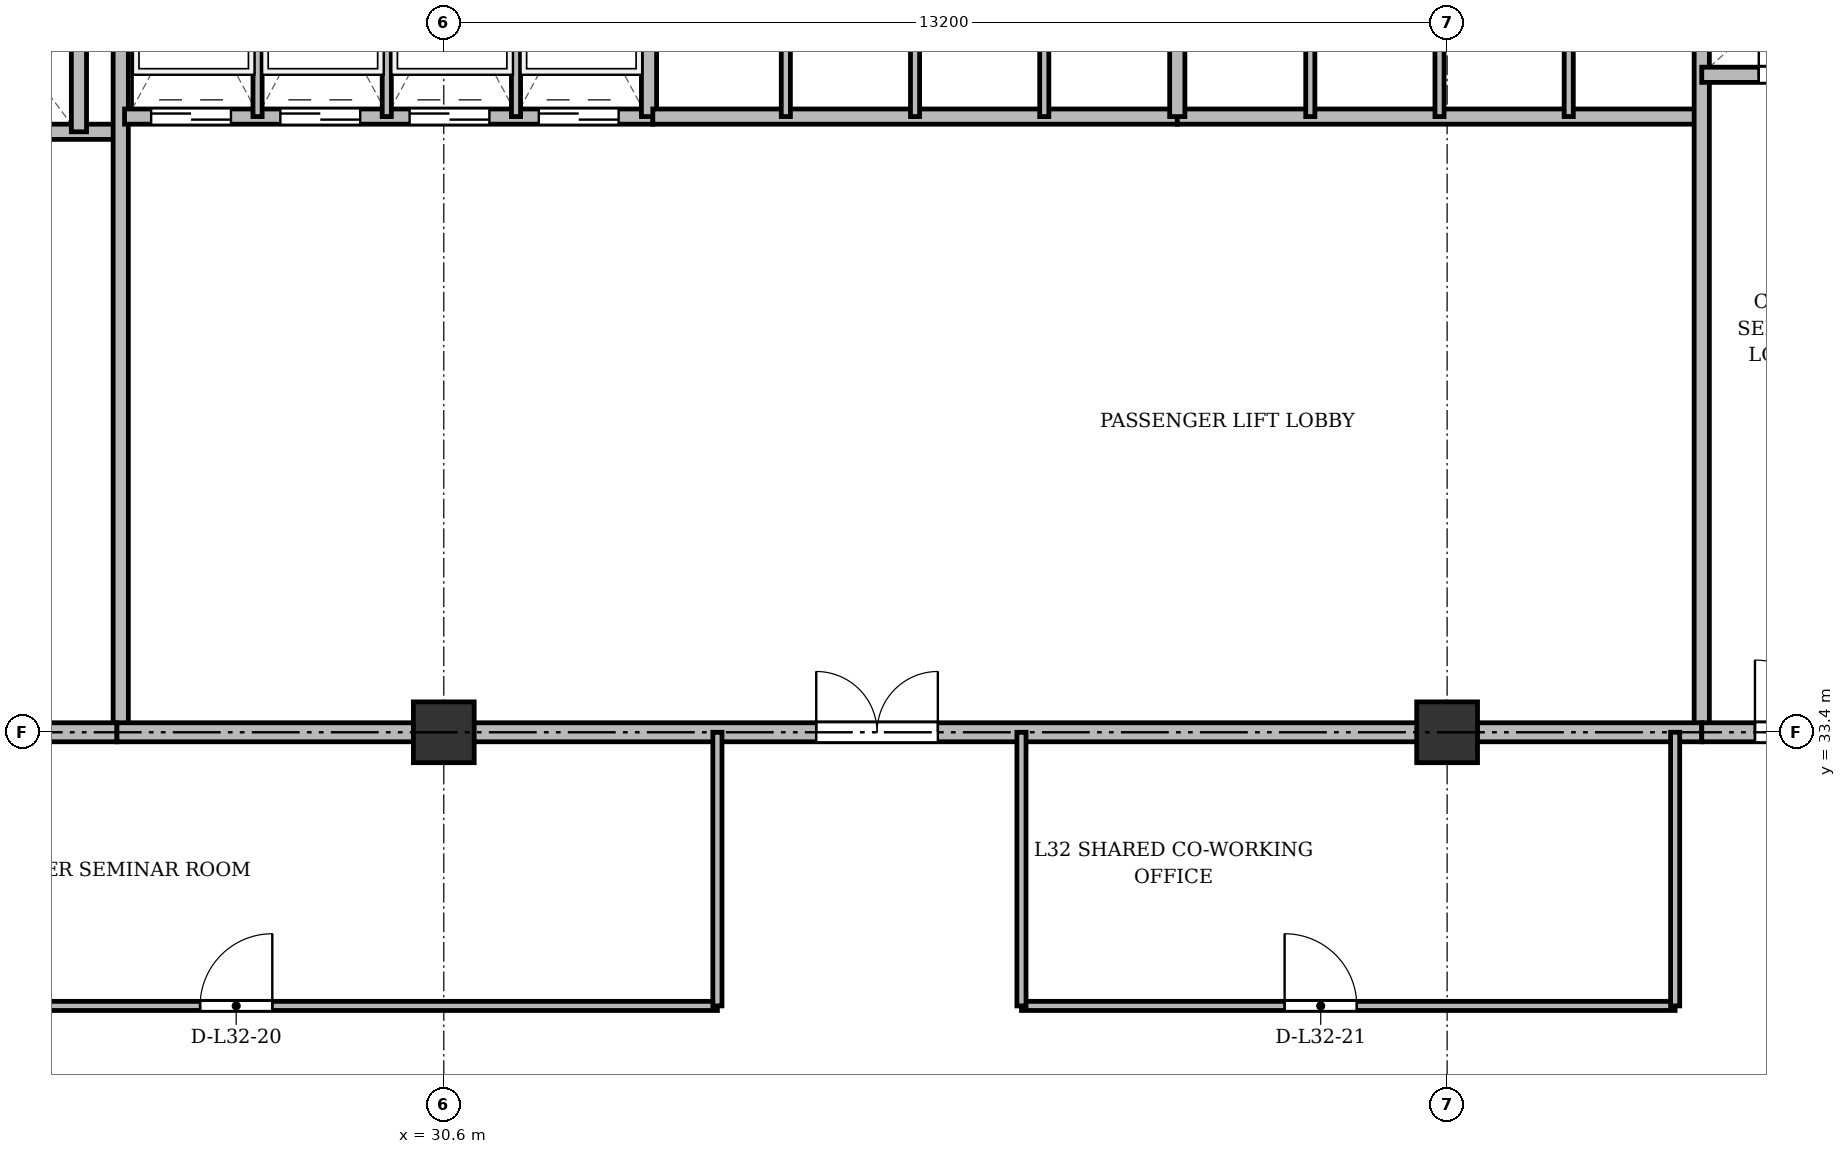
"""IFC4 building model, lengths in metres.
Left out: names, types, materials, properties, quantities, classifications, styles, units other than length and angle.
Written with IfcOpenShell. Run it as: python <this file> out.ifc"""

import sys

from ifc_helpers import new_model, si_unit, direction, frame, frame_2d, origin, origin_2d, place, context, subcontext, project, spatial, rectangle, extrude, source, transform, mapped, element, fill, save


model = new_model("IFC4")
c1 = context("Model", 3, precision=1e-05, world=origin(), true_north=direction((0.0, 1.0)))
c2 = subcontext(c1, "Body", "Model", "MODEL_VIEW")
j1 = project(units=[si_unit("LENGTHUNIT", "METRE"), si_unit("PLANEANGLEUNIT", "RADIAN")], contexts=[c1])
p1 = place(None, origin())
s1 = spatial("IfcSite", under=j1, at=p1, CompositionType="ELEMENT")
p2 = place(p1, origin())
s2 = spatial("IfcBuilding", under=s1, at=p2, CompositionType="ELEMENT")
p3 = place(p2, frame((0.0, 0.0, 124.9)))
s3 = spatial("IfcBuildingStorey", under=s2, at=p3, CompositionType="ELEMENT", Elevation=124.9)
m1 = source(origin(), c2, "Body", "SweptSolid", [
    extrude(rectangle(XDim=0.8, YDim=0.8, at=origin_2d()), origin(), (0.0, 0.0, 1.0), 3.6),
])
for number, where, z_axis, x_axis in (
    (1, (30.6, 33.4, 0.0), (0.0, 0.0, 1.0), (1.0, 0.0, 0.0)),
    (2, (43.8, 33.4, 0.0), (0.0, 0.0, 1.0), (1.0, 0.0, 0.0)),
):
    element("IfcColumn", number, at=place(p3, frame(where, z_axis=z_axis, x_axis=x_axis)), inside=s3, PredefinedType="COLUMN", context=c2, shape_type="MappedRepresentation", body=[
        mapped(m1, transform((0.0, 0.0, 0.0), x_axis=(1.0, 0.0, 0.0), y_axis=(0.0, 1.0, 0.0), z_axis=(0.0, 0.0, 1.0), scale=1.0)),
    ])
p4 = place(p3, frame((19.55, 41.3, 0.0), z_axis=(0.0, 0.0, 1.0), x_axis=(1.0, 0.0, 0.0)))
e3 = element("IfcWall", 3, at=p4, inside=s3, PredefinedType="SOLIDWALL", context=c2, shape_type="SweptSolid", body=[
    extrude(rectangle(XDim=6.75, YDim=0.2, at=frame_2d((3.375, 0.0))), origin(), (0.0, 0.0, 1.0), 3.34),
])
p5 = place(p4, frame((1.7, 0.0, 0.0)))
e4 = element("IfcOpeningElement", 4, at=p5, cuts=e3, PredefinedType="OPENING", context=c2, shape_type="SweptSolid", body=[
    extrude(rectangle(XDim=1.1, YDim=2.15, at=frame_2d((0.55, 1.075))), frame((0.0, 0.11, 0.0), z_axis=(0.0, -1.0, 0.0), x_axis=(1.0, 0.0, 0.0)), (0.0, 0.0, 1.0), 0.22),
])
p6 = place(p4, frame((4.4, 0.0, 0.0)))
e5 = element("IfcOpeningElement", 5, at=p6, cuts=e3, PredefinedType="OPENING", context=c2, shape_type="SweptSolid", body=[
    extrude(rectangle(XDim=1.1, YDim=2.15, at=frame_2d((0.55, 1.075))), frame((0.0, 0.11, 0.0), z_axis=(0.0, -1.0, 0.0), x_axis=(1.0, 0.0, 0.0)), (0.0, 0.0, 1.0), 0.22),
])
p7 = place(p3, frame((25.8, 41.3, 0.0), z_axis=(0.0, 0.0, 1.0), x_axis=(0.0, 1.0, 0.0)))
e6 = element("IfcWall", 6, at=p7, inside=s3, PredefinedType="SOLIDWALL", context=c2, shape_type="SweptSolid", body=[
    extrude(rectangle(XDim=3.4, YDim=0.2, at=frame_2d((1.7, 0.0))), origin(), (0.0, 0.0, 1.0), 3.34),
])
p8 = place(p3, frame((26.35, 33.4, 0.0), z_axis=(0.0, 0.0, 1.0), x_axis=(0.0, 1.0, 0.0)))
e7 = element("IfcWall", 7, at=p8, inside=s3, PredefinedType="SOLIDWALL", context=c2, shape_type="SweptSolid", body=[
    extrude(rectangle(XDim=11.3, YDim=0.2, at=frame_2d((5.65, 0.0))), origin(), (0.0, 0.0, 1.0), 2.752),
])
p9 = place(p3, frame((19.5, 33.4, 0.0), z_axis=(0.0, 0.0, 1.0), x_axis=(1.0, 0.0, 0.0)))
e8 = element("IfcWall", 8, at=p9, inside=s3, PredefinedType="PARTITIONING", context=c2, shape_type="SweptSolid", body=[
    extrude(rectangle(XDim=6.8, YDim=0.25, at=frame_2d((3.4, 0.0))), origin(), (0.0, 0.0, 1.0), 2.752),
])
p10 = place(p9, frame((0.75, 0.0, 0.0)))
e9 = element("IfcOpeningElement", 9, at=p10, cuts=e8, PredefinedType="OPENING", context=c2, shape_type="SweptSolid", body=[
    extrude(rectangle(XDim=1.6, YDim=2.2, at=frame_2d((0.8, 1.1))), frame((0.0, 0.135, 0.0), z_axis=(0.0, -1.0, 0.0), x_axis=(1.0, 0.0, 0.0)), (0.0, 0.0, 1.0), 0.27),
])
p11 = place(p3, frame((26.4, 41.5, 0.0), z_axis=(0.0, 0.0, 1.0), x_axis=(1.0, 0.0, 0.0)))
e10 = element("IfcWall", 10, at=p11, inside=s3, PredefinedType="SOLIDWALL", context=c2, shape_type="SweptSolid", body=[
    extrude(rectangle(XDim=6.95, YDim=0.2, at=frame_2d((3.475, 0.0))), origin(), (0.0, 0.0, 1.0), 3.34),
])
p12 = place(p11, frame((0.35, 0.0, 0.0)))
e11 = element("IfcOpeningElement", 11, at=p12, cuts=e10, PredefinedType="OPENING", context=c2, shape_type="SweptSolid", body=[
    extrude(rectangle(XDim=1.05, YDim=2.15, at=frame_2d((0.525, 1.075))), frame((0.0, 0.11, 0.0), z_axis=(0.0, -1.0, 0.0), x_axis=(1.0, 0.0, 0.0)), (0.0, 0.0, 1.0), 0.22),
])
p13 = place(p11, frame((2.05, 0.0, 0.0)))
e12 = element("IfcOpeningElement", 12, at=p13, cuts=e10, PredefinedType="OPENING", context=c2, shape_type="SweptSolid", body=[
    extrude(rectangle(XDim=1.05, YDim=2.15, at=frame_2d((0.525, 1.075))), frame((0.0, 0.11, 0.0), z_axis=(0.0, -1.0, 0.0), x_axis=(1.0, 0.0, 0.0)), (0.0, 0.0, 1.0), 0.22),
])
p14 = place(p11, frame((3.75, 0.0, 0.0)))
e13 = element("IfcOpeningElement", 13, at=p14, cuts=e10, PredefinedType="OPENING", context=c2, shape_type="SweptSolid", body=[
    extrude(rectangle(XDim=1.05, YDim=2.15, at=frame_2d((0.525, 1.075))), frame((0.0, 0.11, 0.0), z_axis=(0.0, -1.0, 0.0), x_axis=(1.0, 0.0, 0.0)), (0.0, 0.0, 1.0), 0.22),
])
p15 = place(p11, frame((5.45, 0.0, 0.0)))
e14 = element("IfcOpeningElement", 14, at=p15, cuts=e10, PredefinedType="OPENING", context=c2, shape_type="SweptSolid", body=[
    extrude(rectangle(XDim=1.05, YDim=2.15, at=frame_2d((0.525, 1.075))), frame((0.0, 0.11, 0.0), z_axis=(0.0, -1.0, 0.0), x_axis=(1.0, 0.0, 0.0)), (0.0, 0.0, 1.0), 0.22),
])
p16 = place(p3, frame((33.3, 41.5, 0.0), z_axis=(0.0, 0.0, 1.0), x_axis=(0.0, 1.0, 0.0)))
e15 = element("IfcWall", 15, at=p16, inside=s3, PredefinedType="SOLIDWALL", context=c2, shape_type="SweptSolid", body=[
    extrude(rectangle(XDim=3.2, YDim=0.2, at=frame_2d((1.6, 0.0))), origin(), (0.0, 0.0, 1.0), 3.34),
])
for number, where, z_axis, x_axis in (
    (16, (28.15, 41.5, 0.0), (0.0, 0.0, 1.0), (0.0, 1.0, 0.0)),
    (17, (29.85, 41.5, 0.0), (0.0, 0.0, 1.0), (0.0, 1.0, 0.0)),
    (18, (31.55, 41.5, 0.0), (0.0, 0.0, 1.0), (0.0, 1.0, 0.0)),
):
    element("IfcWall", number, at=place(p3, frame(where, z_axis=z_axis, x_axis=x_axis)), inside=s3, PredefinedType="PARTITIONING", context=c2, shape_type="SweptSolid", body=[
        extrude(rectangle(XDim=3.2, YDim=0.12, at=frame_2d((1.6, 0.0))), origin(), (0.0, 0.0, 1.0), 3.34),
    ])
p17 = place(p3, frame((33.35, 41.5, 0.0), z_axis=(0.0, 0.0, 1.0), x_axis=(1.0, 0.0, 0.0)))
e19 = element("IfcWall", 19, at=p17, inside=s3, PredefinedType="SOLIDWALL", context=c2, shape_type="SweptSolid", body=[
    extrude(rectangle(XDim=6.9, YDim=0.2, at=frame_2d((3.45, 0.0))), origin(), (0.0, 0.0, 1.0), 3.34),
])
for number, where, z_axis, x_axis in (
    (20, (35.1, 41.5, 0.0), (0.0, 0.0, 1.0), (0.0, 1.0, 0.0)),
    (21, (36.8, 41.5, 0.0), (0.0, 0.0, 1.0), (0.0, 1.0, 0.0)),
    (22, (38.5, 41.5, 0.0), (0.0, 0.0, 1.0), (0.0, 1.0, 0.0)),
):
    element("IfcWall", number, at=place(p3, frame(where, z_axis=z_axis, x_axis=x_axis)), inside=s3, PredefinedType="PARTITIONING", context=c2, shape_type="SweptSolid", body=[
        extrude(rectangle(XDim=3.2, YDim=0.12, at=frame_2d((1.6, 0.0))), origin(), (0.0, 0.0, 1.0), 3.34),
    ])
p18 = place(p3, frame((40.25, 41.5, 0.0), z_axis=(0.0, 0.0, 1.0), x_axis=(1.0, 0.0, 0.0)))
e23 = element("IfcWall", 23, at=p18, inside=s3, PredefinedType="SOLIDWALL", context=c2, shape_type="SweptSolid", body=[
    extrude(rectangle(XDim=6.9, YDim=0.2, at=frame_2d((3.45, 0.0))), origin(), (0.0, 0.0, 1.0), 3.34),
])
p19 = place(p3, frame((40.25, 41.5, 0.0), z_axis=(0.0, 0.0, 1.0), x_axis=(0.0, 1.0, 0.0)))
e24 = element("IfcWall", 24, at=p19, inside=s3, PredefinedType="SOLIDWALL", context=c2, shape_type="SweptSolid", body=[
    extrude(rectangle(XDim=3.2, YDim=0.2, at=frame_2d((1.6, 0.0))), origin(), (0.0, 0.0, 1.0), 3.34),
])
for number, where, z_axis, x_axis in (
    (25, (42.0, 41.5, 0.0), (0.0, 0.0, 1.0), (0.0, 1.0, 0.0)),
    (26, (43.7, 41.5, 0.0), (0.0, 0.0, 1.0), (0.0, 1.0, 0.0)),
    (27, (45.4, 41.5, 0.0), (0.0, 0.0, 1.0), (0.0, 1.0, 0.0)),
):
    element("IfcWall", number, at=place(p3, frame(where, z_axis=z_axis, x_axis=x_axis)), inside=s3, PredefinedType="PARTITIONING", context=c2, shape_type="SweptSolid", body=[
        extrude(rectangle(XDim=3.2, YDim=0.12, at=frame_2d((1.6, 0.0))), origin(), (0.0, 0.0, 1.0), 3.34),
    ])
p20 = place(p3, frame((47.15, 33.4, 0.0), z_axis=(0.0, 0.0, 1.0), x_axis=(0.0, 1.0, 0.0)))
e28 = element("IfcWall", 28, at=p20, inside=s3, PredefinedType="SOLIDWALL", context=c2, shape_type="SweptSolid", body=[
    extrude(rectangle(XDim=11.3, YDim=0.2, at=frame_2d((5.65, 0.0))), origin(), (0.0, 0.0, 1.0), 2.752),
])
p21 = place(p3, frame((26.3, 33.4, 0.0), z_axis=(0.0, 0.0, 1.0), x_axis=(1.0, 0.0, 0.0)))
e29 = element("IfcWall", 29, at=p21, inside=s3, PredefinedType="PARTITIONING", context=c2, shape_type="SweptSolid", body=[
    extrude(rectangle(XDim=20.85, YDim=0.25, at=frame_2d((10.425, 0.0))), origin(), (0.0, 0.0, 1.0), 2.752),
])
p22 = place(p21, frame((9.2, 0.0, 0.0)))
e30 = element("IfcOpeningElement", 30, at=p22, cuts=e29, PredefinedType="OPENING", context=c2, shape_type="SweptSolid", body=[
    extrude(rectangle(XDim=1.6, YDim=2.2, at=frame_2d((0.8, 1.1))), frame((0.0, 0.135, 0.0), z_axis=(0.0, -1.0, 0.0), x_axis=(1.0, 0.0, 0.0)), (0.0, 0.0, 1.0), 0.27),
])
p23 = place(p3, frame((47.15, 42.05, 0.0), z_axis=(0.0, 0.0, 1.0), x_axis=(1.0, 0.0, 0.0)))
e31 = element("IfcWall", 31, at=p23, inside=s3, PredefinedType="SOLIDWALL", context=c2, shape_type="SweptSolid", body=[
    extrude(rectangle(XDim=7.85, YDim=0.2, at=frame_2d((3.925, 0.0))), origin(), (0.0, 0.0, 1.0), 2.84),
])
p24 = place(p23, frame((0.75, 0.0, 0.0)))
e32 = element("IfcOpeningElement", 32, at=p24, cuts=e31, PredefinedType="OPENING", context=c2, shape_type="SweptSolid", body=[
    extrude(rectangle(XDim=0.9, YDim=2.1, at=frame_2d((0.45, 1.05))), frame((0.0, 0.11, 0.0), z_axis=(0.0, -1.0, 0.0), x_axis=(1.0, 0.0, 0.0)), (0.0, 0.0, 1.0), 0.22),
])
p25 = place(p23, frame((3.85, 0.0, 0.0)))
e33 = element("IfcOpeningElement", 33, at=p25, cuts=e31, PredefinedType="OPENING", context=c2, shape_type="SweptSolid", body=[
    extrude(rectangle(XDim=0.9, YDim=2.1, at=frame_2d((0.45, 1.05))), frame((0.0, 0.11, 0.0), z_axis=(0.0, -1.0, 0.0), x_axis=(1.0, 0.0, 0.0)), (0.0, 0.0, 1.0), 0.22),
])
p26 = place(p3, frame((47.15, 33.4, 0.0), z_axis=(0.0, 0.0, 1.0), x_axis=(1.0, 0.0, 0.0)))
e34 = element("IfcWall", 34, at=p26, inside=s3, PredefinedType="PARTITIONING", context=c2, shape_type="SweptSolid", body=[
    extrude(rectangle(XDim=11.15, YDim=0.25, at=frame_2d((5.575, 0.0))), origin(), (0.0, 0.0, 1.0), 2.752),
])
p27 = place(p26, frame((0.7, 0.0, 0.0)))
e35 = element("IfcOpeningElement", 35, at=p27, cuts=e34, PredefinedType="OPENING", context=c2, shape_type="SweptSolid", body=[
    extrude(rectangle(XDim=0.95, YDim=2.15, at=frame_2d((0.475, 1.075))), frame((0.0, 0.135, 0.0), z_axis=(0.0, -1.0, 0.0), x_axis=(1.0, 0.0, 0.0)), (0.0, 0.0, 1.0), 0.27),
])
p28 = place(p26, frame((6.0, 0.0, 0.0)))
e36 = element("IfcOpeningElement", 36, at=p28, cuts=e34, PredefinedType="OPENING", context=c2, shape_type="SweptSolid", body=[
    extrude(rectangle(XDim=1.2, YDim=2.15, at=frame_2d((0.6, 1.075))), frame((0.0, 0.135, 0.0), z_axis=(0.0, -1.0, 0.0), x_axis=(1.0, 0.0, 0.0)), (0.0, 0.0, 1.0), 0.27),
])
p29 = place(p3, frame((22.45, 29.8, 0.0), z_axis=(0.0, 0.0, 1.0), x_axis=(1.0, 0.0, 0.0)))
e37 = element("IfcWall", 37, at=p29, inside=s3, PredefinedType="PARTITIONING", context=c2, shape_type="SweptSolid", body=[
    extrude(rectangle(XDim=11.75, YDim=0.12, at=frame_2d((5.875, 0.0))), origin(), (0.0, 0.0, 1.0), 2.84),
])
p30 = place(p29, frame((4.944, 0.0, 0.0)))
e38 = element("IfcOpeningElement", 38, at=p30, cuts=e37, PredefinedType="OPENING", context=c2, shape_type="SweptSolid", body=[
    extrude(rectangle(XDim=0.95, YDim=2.15, at=frame_2d((0.475, 1.075))), frame((0.0, 0.07, 0.0), z_axis=(0.0, -1.0, 0.0), x_axis=(1.0, 0.0, 0.0)), (0.0, 0.0, 1.0), 0.14),
])
p31 = place(p3, frame((38.2, 29.8, 0.0), z_axis=(0.0, 0.0, 1.0), x_axis=(1.0, 0.0, 0.0)))
e39 = element("IfcWall", 39, at=p31, inside=s3, PredefinedType="PARTITIONING", context=c2, shape_type="SweptSolid", body=[
    extrude(rectangle(XDim=8.6, YDim=0.12, at=frame_2d((4.3, 0.0))), origin(), (0.0, 0.0, 1.0), 2.84),
])
p32 = place(p31, frame((3.462, 0.0, 0.0)))
e40 = element("IfcOpeningElement", 40, at=p32, cuts=e39, PredefinedType="OPENING", context=c2, shape_type="SweptSolid", body=[
    extrude(rectangle(XDim=0.95, YDim=2.15, at=frame_2d((0.475, 1.075))), frame((0.0, 0.07, 0.0), z_axis=(0.0, -1.0, 0.0), x_axis=(1.0, 0.0, 0.0)), (0.0, 0.0, 1.0), 0.14),
])
for number, where, z_axis, x_axis in (
    (41, (34.2, 29.8, 0.0), (0.0, 0.0, 1.0), (0.0, 1.0, 0.0)),
    (42, (38.2, 29.8, 0.0), (0.0, 0.0, 1.0), (0.0, 1.0, 0.0)),
    (43, (46.8, 29.8, 0.0), (0.0, 0.0, 1.0), (0.0, 1.0, 0.0)),
):
    element("IfcWall", number, at=place(p3, frame(where, z_axis=z_axis, x_axis=x_axis)), inside=s3, PredefinedType="PARTITIONING", context=c2, shape_type="SweptSolid", body=[
        extrude(rectangle(XDim=3.6, YDim=0.12, at=frame_2d((1.8, 0.0))), origin(), (0.0, 0.0, 1.0), 2.752),
    ])
m2 = source(origin(), c2, "Body", "SweptSolid", [
    extrude(rectangle(XDim=1.05, YDim=2.15, at=frame_2d((0.525, 1.075))), frame((0.0, 0.025, 0.0), z_axis=(0.0, -1.0, 0.0), x_axis=(1.0, 0.0, 0.0)), (0.0, 0.0, 1.0), 0.05),
])
p33 = place(p12, origin())
e44 = element("IfcDoor", 44, at=p33, inside=s3, OperationType="DOUBLE_DOOR_SLIDING", PredefinedType="DOOR", context=c2, shape_type="MappedRepresentation", body=[
    mapped(m2, transform((0.0, 0.0, 0.0), x_axis=(1.0, 0.0, 0.0), y_axis=(0.0, 1.0, 0.0), z_axis=(0.0, 0.0, 1.0), scale=1.0)),
])
fill(e11, e44)
p34 = place(p13, origin())
e45 = element("IfcDoor", 45, at=p34, inside=s3, OperationType="DOUBLE_DOOR_SLIDING", PredefinedType="DOOR", context=c2, shape_type="MappedRepresentation", body=[
    mapped(m2, transform((0.0, 0.0, 0.0), x_axis=(1.0, 0.0, 0.0), y_axis=(0.0, 1.0, 0.0), z_axis=(0.0, 0.0, 1.0), scale=1.0)),
])
fill(e12, e45)
p35 = place(p14, origin())
e46 = element("IfcDoor", 46, at=p35, inside=s3, OperationType="DOUBLE_DOOR_SLIDING", PredefinedType="DOOR", context=c2, shape_type="MappedRepresentation", body=[
    mapped(m2, transform((0.0, 0.0, 0.0), x_axis=(1.0, 0.0, 0.0), y_axis=(0.0, 1.0, 0.0), z_axis=(0.0, 0.0, 1.0), scale=1.0)),
])
fill(e13, e46)
p36 = place(p15, origin())
e47 = element("IfcDoor", 47, at=p36, inside=s3, OperationType="DOUBLE_DOOR_SLIDING", PredefinedType="DOOR", context=c2, shape_type="MappedRepresentation", body=[
    mapped(m2, transform((0.0, 0.0, 0.0), x_axis=(1.0, 0.0, 0.0), y_axis=(0.0, 1.0, 0.0), z_axis=(0.0, 0.0, 1.0), scale=1.0)),
])
fill(e14, e47)
m3 = source(origin(), c2, "Body", "SweptSolid", [
    extrude(rectangle(XDim=1.6, YDim=2.2, at=frame_2d((0.8, 1.1))), frame((0.0, 0.025, 0.0), z_axis=(0.0, -1.0, 0.0), x_axis=(1.0, 0.0, 0.0)), (0.0, 0.0, 1.0), 0.05),
])
p37 = place(p22, origin())
e48 = element("IfcDoor", 48, at=p37, inside=s3, OperationType="DOUBLE_DOOR_SINGLE_SWING", PredefinedType="DOOR", context=c2, shape_type="MappedRepresentation", body=[
    mapped(m3, transform((0.0, 0.0, 0.0), x_axis=(1.0, 0.0, 0.0), y_axis=(0.0, 1.0, 0.0), z_axis=(0.0, 0.0, 1.0), scale=1.0)),
])
fill(e30, e48)
m4 = source(origin(), c2, "Body", "SweptSolid", [
    extrude(rectangle(XDim=0.9, YDim=2.1, at=frame_2d((0.45, 1.05))), frame((0.0, 0.025, 0.0), z_axis=(0.0, -1.0, 0.0), x_axis=(1.0, 0.0, 0.0)), (0.0, 0.0, 1.0), 0.05),
])
p38 = place(p24, origin())
e49 = element("IfcDoor", 49, at=p38, inside=s3, OperationType="SINGLE_SWING_LEFT", PredefinedType="DOOR", context=c2, shape_type="MappedRepresentation", body=[
    mapped(m4, transform((0.0, 0.0, 0.0), x_axis=(1.0, 0.0, 0.0), y_axis=(0.0, 1.0, 0.0), z_axis=(0.0, 0.0, 1.0), scale=1.0)),
])
fill(e32, e49)
m5 = source(origin(), c2, "Body", "SweptSolid", [
    extrude(rectangle(XDim=0.95, YDim=2.15, at=frame_2d((0.475, 1.075))), frame((0.0, 0.025, 0.0), z_axis=(0.0, -1.0, 0.0), x_axis=(1.0, 0.0, 0.0)), (0.0, 0.0, 1.0), 0.05),
])
p39 = place(p27, origin())
e50 = element("IfcDoor", 50, at=p39, inside=s3, OperationType="SINGLE_SWING_LEFT", PredefinedType="DOOR", context=c2, shape_type="MappedRepresentation", body=[
    mapped(m5, transform((0.0, 0.0, 0.0), x_axis=(1.0, 0.0, 0.0), y_axis=(0.0, 1.0, 0.0), z_axis=(0.0, 0.0, 1.0), scale=1.0)),
])
fill(e35, e50)
p40 = place(p30, origin())
e51 = element("IfcDoor", 51, at=p40, inside=s3, OperationType="SINGLE_SWING_RIGHT", PredefinedType="DOOR", context=c2, shape_type="MappedRepresentation", body=[
    mapped(m5, transform((0.0, 0.0, 0.0), x_axis=(1.0, 0.0, 0.0), y_axis=(0.0, 1.0, 0.0), z_axis=(0.0, 0.0, 1.0), scale=1.0)),
])
fill(e38, e51)
p41 = place(p32, origin())
e52 = element("IfcDoor", 52, at=p41, inside=s3, OperationType="SINGLE_SWING_LEFT", PredefinedType="DOOR", context=c2, shape_type="MappedRepresentation", body=[
    mapped(m5, transform((0.0, 0.0, 0.0), x_axis=(1.0, 0.0, 0.0), y_axis=(0.0, 1.0, 0.0), z_axis=(0.0, 0.0, 1.0), scale=1.0)),
])
fill(e40, e52)
save(model, sys.argv[1])
